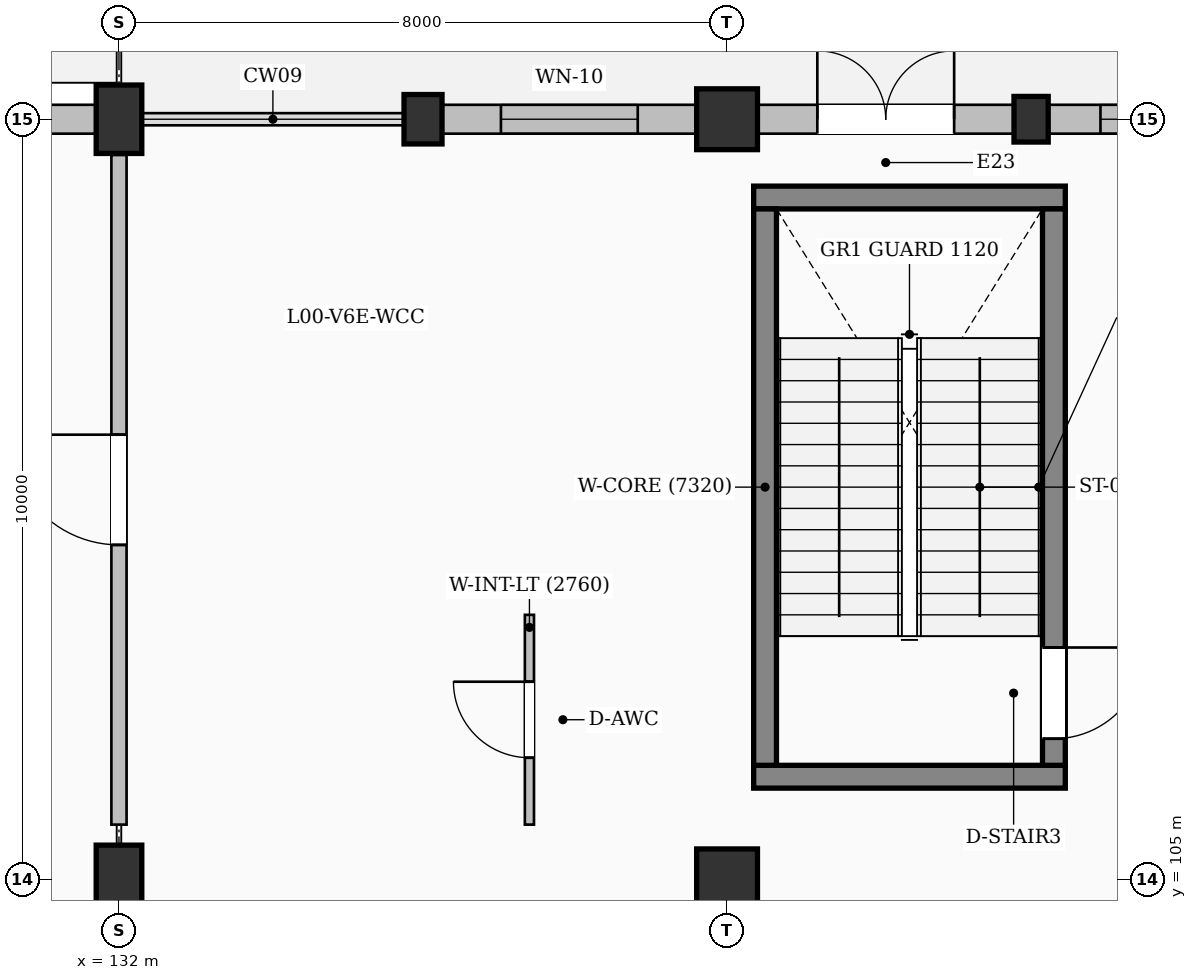
"""IFC4 building model, lengths in metres.
Left out: names, types, materials, properties, quantities, classifications, styles, units other than length and angle.
Written with IfcOpenShell. Run it as: python <this file> out.ifc"""

import sys

from ifc_helpers import new_model, si_unit, direction, frame, frame_2d, origin, origin_2d, place, context, subcontext, project, spatial, rectangle, extrude, element, fill, save


model = new_model("IFC4")
c1 = context("Model", 3, precision=1e-05, world=origin(), true_north=direction((0.0, 1.0)))
c2 = subcontext(c1, "Body", "Model", "MODEL_VIEW")
j1 = project(units=[si_unit("LENGTHUNIT", "METRE"), si_unit("PLANEANGLEUNIT", "RADIAN")], contexts=[c1])
p1 = place(None, origin())
s1 = spatial("IfcSite", under=j1, at=p1, CompositionType="ELEMENT")
p2 = place(p1, origin())
s2 = spatial("IfcBuilding", under=s1, at=p2, CompositionType="ELEMENT")
p3 = place(p2, origin())
s3 = spatial("IfcBuildingStorey", under=s2, at=p3, CompositionType="ELEMENT", Elevation=0.0)
for number, where, z_axis, x_axis in (
    (1, (132.0, 105.0, 0.0), (0.0, 0.0, 1.0), (1.0, 0.0, 0.0)),
    (2, (132.0, 115.0, 0.0), (0.0, 0.0, 1.0), (1.0, 0.0, 0.0)),
):
    element("IfcColumn", number, at=place(p3, frame(where, z_axis=z_axis, x_axis=x_axis)), inside=s3, PredefinedType="COLUMN", context=c2, shape_type="SweptSolid", body=[
        extrude(rectangle(XDim=0.6, YDim=0.9, at=origin_2d()), origin(), (0.0, 0.0, 1.0), 4.8),
    ])
p4 = place(p3, frame((136.0, 115.0, 0.0), z_axis=(0.0, 0.0, 1.0), x_axis=(1.0, 0.0, 0.0)))
e3 = element("IfcColumn", 3, at=p4, inside=s3, PredefinedType="PILASTER", context=c2, shape_type="SweptSolid", body=[
    extrude(rectangle(XDim=0.5, YDim=0.65, at=origin_2d()), origin(), (0.0, 0.0, 1.0), 4.8),
])
for number, where, z_axis, x_axis in (
    (4, (140.0, 105.0, 0.0), (0.0, 0.0, 1.0), (1.0, 0.0, 0.0)),
    (5, (140.0, 115.0, 0.0), (0.0, 0.0, 1.0), (1.0, 0.0, 0.0)),
):
    element("IfcColumn", number, at=place(p3, frame(where, z_axis=z_axis, x_axis=x_axis)), inside=s3, PredefinedType="COLUMN", context=c2, shape_type="SweptSolid", body=[
        extrude(rectangle(XDim=0.8, YDim=0.8, at=origin_2d()), origin(), (0.0, 0.0, 1.0), 4.8),
    ])
p5 = place(p3, frame((144.0, 115.0, 0.0), z_axis=(0.0, 0.0, 1.0), x_axis=(1.0, 0.0, 0.0)))
e6 = element("IfcColumn", 6, at=p5, inside=s3, PredefinedType="PILASTER", context=c2, shape_type="SweptSolid", body=[
    extrude(rectangle(XDim=0.45, YDim=0.6, at=origin_2d()), origin(), (0.0, 0.0, 1.0), 4.8),
])
p6 = place(p3, frame((128.2, 115.0, 0.0), z_axis=(0.0, 0.0, 1.0), x_axis=(1.0, 0.0, 0.0)))
e7 = element("IfcWall", 7, at=p6, inside=s3, PredefinedType="SOLIDWALL", context=c2, shape_type="SweptSolid", body=[
    extrude(rectangle(XDim=3.5, YDim=0.38, at=frame_2d((1.75, 0.0))), origin(), (0.0, 0.0, 1.0), 3.935),
])
p7 = place(p6, frame((0.85, 0.0, 0.95)))
e8 = element("IfcOpeningElement", 8, at=p7, cuts=e7, PredefinedType="OPENING", context=c2, shape_type="SweptSolid", body=[
    extrude(rectangle(XDim=1.8, YDim=1.8, at=frame_2d((0.9, 0.9))), frame((0.0, 0.2, 0.0), z_axis=(0.0, -1.0, 0.0), x_axis=(1.0, 0.0, 0.0)), (0.0, 0.0, 1.0), 0.4),
])
p8 = place(p3, frame((136.25, 115.0, 0.0), z_axis=(0.0, 0.0, 1.0), x_axis=(1.0, 0.0, 0.0)))
e9 = element("IfcWall", 9, at=p8, inside=s3, PredefinedType="SOLIDWALL", context=c2, shape_type="SweptSolid", body=[
    extrude(rectangle(XDim=3.35, YDim=0.38, at=frame_2d((1.675, 0.0))), origin(), (0.0, 0.0, 1.0), 4.235),
])
p9 = place(p8, frame((0.775, 0.0, 0.95)))
e10 = element("IfcOpeningElement", 10, at=p9, cuts=e9, PredefinedType="OPENING", context=c2, shape_type="SweptSolid", body=[
    extrude(rectangle(XDim=1.8, YDim=1.5, at=frame_2d((0.9, 0.75))), frame((0.0, 0.2, 0.0), z_axis=(0.0, -1.0, 0.0), x_axis=(1.0, 0.0, 0.0)), (0.0, 0.0, 1.0), 0.4),
])
p10 = place(p3, frame((140.4, 115.0, 0.0), z_axis=(0.0, 0.0, 1.0), x_axis=(1.0, 0.0, 0.0)))
e11 = element("IfcWall", 11, at=p10, inside=s3, PredefinedType="SOLIDWALL", context=c2, shape_type="SweptSolid", body=[
    extrude(rectangle(XDim=3.375, YDim=0.38, at=frame_2d((1.688, 0.0))), origin(), (0.0, 0.0, 1.0), 4.035),
])
p11 = place(p10, frame((0.788, 0.0, 0.0)))
e12 = element("IfcOpeningElement", 12, at=p11, cuts=e11, PredefinedType="OPENING", context=c2, shape_type="SweptSolid", body=[
    extrude(rectangle(XDim=1.8, YDim=2.25, at=frame_2d((0.9, 1.125))), frame((0.0, 0.2, 0.0), z_axis=(0.0, -1.0, 0.0), x_axis=(1.0, 0.0, 0.0)), (0.0, 0.0, 1.0), 0.4),
])
p12 = place(p3, frame((144.225, 115.0, 0.0), z_axis=(0.0, 0.0, 1.0), x_axis=(1.0, 0.0, 0.0)))
e13 = element("IfcWall", 13, at=p12, inside=s3, PredefinedType="SOLIDWALL", context=c2, shape_type="SweptSolid", body=[
    extrude(rectangle(XDim=3.375, YDim=0.38, at=frame_2d((1.688, 0.0))), origin(), (0.0, 0.0, 1.0), 4.035),
])
p13 = place(p12, frame((0.688, 0.0, 0.95)))
e14 = element("IfcOpeningElement", 14, at=p13, cuts=e13, PredefinedType="OPENING", context=c2, shape_type="SweptSolid", body=[
    extrude(rectangle(XDim=2.0, YDim=1.2, at=frame_2d((1.0, 0.6))), frame((0.0, 0.2, 0.0), z_axis=(0.0, -1.0, 0.0), x_axis=(1.0, 0.0, 0.0)), (0.0, 0.0, 1.0), 0.4),
])
for number, where, z_axis, x_axis in (
    (15, (140.35, 106.35, 0.0), (0.0, 0.0, 1.0), (1.0, 0.0, 0.0)),
    (16, (144.45, 113.97, 0.0), (0.0, 0.0, 1.0), (-1.0, 0.0, 0.0)),
):
    element("IfcWall", number, at=place(p3, frame(where, z_axis=z_axis, x_axis=x_axis)), inside=s3, PredefinedType="SHEAR", context=c2, shape_type="SweptSolid", body=[
        extrude(rectangle(XDim=4.1, YDim=0.3, at=frame_2d((2.05, 0.0))), origin(), (0.0, 0.0, 1.0), 4.55),
    ])
p14 = place(p3, frame((140.5, 106.5, 0.0), z_axis=(0.0, 0.0, 1.0), x_axis=(0.0, 1.0, 0.0)))
e17 = element("IfcWall", 17, at=p14, inside=s3, PredefinedType="SHEAR", context=c2, shape_type="SweptSolid", body=[
    extrude(rectangle(XDim=7.32, YDim=0.3, at=frame_2d((3.66, 0.0))), origin(), (0.0, 0.0, 1.0), 4.55),
])
p15 = place(p3, frame((144.3, 113.82, 0.0), z_axis=(0.0, 0.0, 1.0), x_axis=(0.0, -1.0, 0.0)))
e18 = element("IfcWall", 18, at=p15, inside=s3, PredefinedType="SHEAR", context=c2, shape_type="SweptSolid", body=[
    extrude(rectangle(XDim=7.32, YDim=0.3, at=frame_2d((3.66, 0.0))), origin(), (0.0, 0.0, 1.0), 4.55),
])
p16 = place(p15, frame((5.77, 0.0, 0.0)))
e19 = element("IfcOpeningElement", 19, at=p16, cuts=e18, PredefinedType="OPENING", context=c2, shape_type="SweptSolid", body=[
    extrude(rectangle(XDim=1.2, YDim=2.15, at=frame_2d((0.6, 1.075))), frame((0.0, 0.16, 0.0), z_axis=(0.0, -1.0, 0.0), x_axis=(1.0, 0.0, 0.0)), (0.0, 0.0, 1.0), 0.32),
])
p17 = place(p3, frame((132.0, 105.72, 0.0), z_axis=(0.0, 0.0, 1.0), x_axis=(0.0, 1.0, 0.0)))
e20 = element("IfcWall", 20, at=p17, inside=s3, PredefinedType="PARTITIONING", context=c2, shape_type="SweptSolid", body=[
    extrude(rectangle(XDim=8.81, YDim=0.2, at=frame_2d((4.405, 0.0))), origin(), (0.0, 0.0, 1.0), 4.175),
])
p18 = place(p17, frame((3.68, 0.0, 0.0)))
e21 = element("IfcOpeningElement", 21, at=p18, cuts=e20, PredefinedType="OPENING", context=c2, shape_type="SweptSolid", body=[
    extrude(rectangle(XDim=1.45, YDim=2.25, at=frame_2d((0.725, 1.125))), frame((0.0, 0.11, 0.0), z_axis=(0.0, -1.0, 0.0), x_axis=(1.0, 0.0, 0.0)), (0.0, 0.0, 1.0), 0.22),
])
p19 = place(p3, frame((137.4, 105.72, 0.0), z_axis=(0.0, 0.0, 1.0), x_axis=(0.0, 1.0, 0.0)))
e22 = element("IfcWall", 22, at=p19, inside=s3, PredefinedType="PARTITIONING", context=c2, shape_type="SweptSolid", body=[
    extrude(rectangle(XDim=2.76, YDim=0.12, at=frame_2d((1.38, 0.0))), origin(), (0.0, 0.0, 1.0), 4.55),
])
p20 = place(p19, frame((0.88, 0.0, 0.0)))
e23 = element("IfcOpeningElement", 23, at=p20, cuts=e22, PredefinedType="OPENING", context=c2, shape_type="SweptSolid", body=[
    extrude(rectangle(XDim=1.0, YDim=2.1, at=frame_2d((0.5, 1.05))), frame((0.0, 0.07, 0.0), z_axis=(0.0, -1.0, 0.0), x_axis=(1.0, 0.0, 0.0)), (0.0, 0.0, 1.0), 0.14),
])
p21 = place(p9, origin())
e24 = element("IfcWindow", 24, at=p21, inside=s3, PartitioningType="DOUBLE_PANEL_VERTICAL", PredefinedType="WINDOW", context=c2, shape_type="SweptSolid", body=[
    extrude(rectangle(XDim=1.8, YDim=1.5, at=frame_2d((0.9, 0.75))), frame((0.0, 0.03, 0.0), z_axis=(0.0, -1.0, 0.0), x_axis=(1.0, 0.0, 0.0)), (0.0, 0.0, 1.0), 0.06),
])
fill(e10, e24)
p22 = place(p11, origin())
e25 = element("IfcDoor", 25, at=p22, inside=s3, OperationType="DOUBLE_DOOR_SINGLE_SWING", PredefinedType="DOOR", context=c2, shape_type="SweptSolid", body=[
    extrude(rectangle(XDim=1.8, YDim=2.25, at=frame_2d((0.9, 1.125))), frame((0.0, 0.025, 0.0), z_axis=(0.0, -1.0, 0.0), x_axis=(1.0, 0.0, 0.0)), (0.0, 0.0, 1.0), 0.05),
])
fill(e12, e25)
p23 = place(p13, origin())
e26 = element("IfcWindow", 26, at=p23, inside=s3, PartitioningType="DOUBLE_PANEL_HORIZONTAL", PredefinedType="WINDOW", context=c2, shape_type="SweptSolid", body=[
    extrude(rectangle(XDim=2.0, YDim=1.2, at=frame_2d((1.0, 0.6))), frame((0.0, 0.03, 0.0), z_axis=(0.0, -1.0, 0.0), x_axis=(1.0, 0.0, 0.0)), (0.0, 0.0, 1.0), 0.06),
])
fill(e14, e26)
p24 = place(p16, origin())
e27 = element("IfcDoor", 27, at=p24, inside=s3, OperationType="SINGLE_SWING_LEFT", PredefinedType="DOOR", context=c2, shape_type="SweptSolid", body=[
    extrude(rectangle(XDim=1.2, YDim=2.15, at=frame_2d((0.6, 1.075))), frame((0.0, 0.025, 0.0), z_axis=(0.0, -1.0, 0.0), x_axis=(1.0, 0.0, 0.0)), (0.0, 0.0, 1.0), 0.05),
])
fill(e19, e27)
p25 = place(p18, origin())
e28 = element("IfcDoor", 28, at=p25, inside=s3, OperationType="SINGLE_SWING_RIGHT", PredefinedType="DOOR", context=c2, shape_type="SweptSolid", body=[
    extrude(rectangle(XDim=1.45, YDim=2.25, at=frame_2d((0.725, 1.125))), frame((0.0, 0.025, 0.0), z_axis=(0.0, -1.0, 0.0), x_axis=(1.0, 0.0, 0.0)), (0.0, 0.0, 1.0), 0.05),
])
fill(e21, e28)
p26 = place(p20, origin())
e29 = element("IfcDoor", 29, at=p26, inside=s3, OperationType="SINGLE_SWING_RIGHT", PredefinedType="DOOR", context=c2, shape_type="SweptSolid", body=[
    extrude(rectangle(XDim=1.0, YDim=2.1, at=frame_2d((0.5, 1.05))), frame((0.0, 0.025, 0.0), z_axis=(0.0, -1.0, 0.0), x_axis=(1.0, 0.0, 0.0)), (0.0, 0.0, 1.0), 0.05),
])
fill(e23, e29)
save(model, sys.argv[1])
